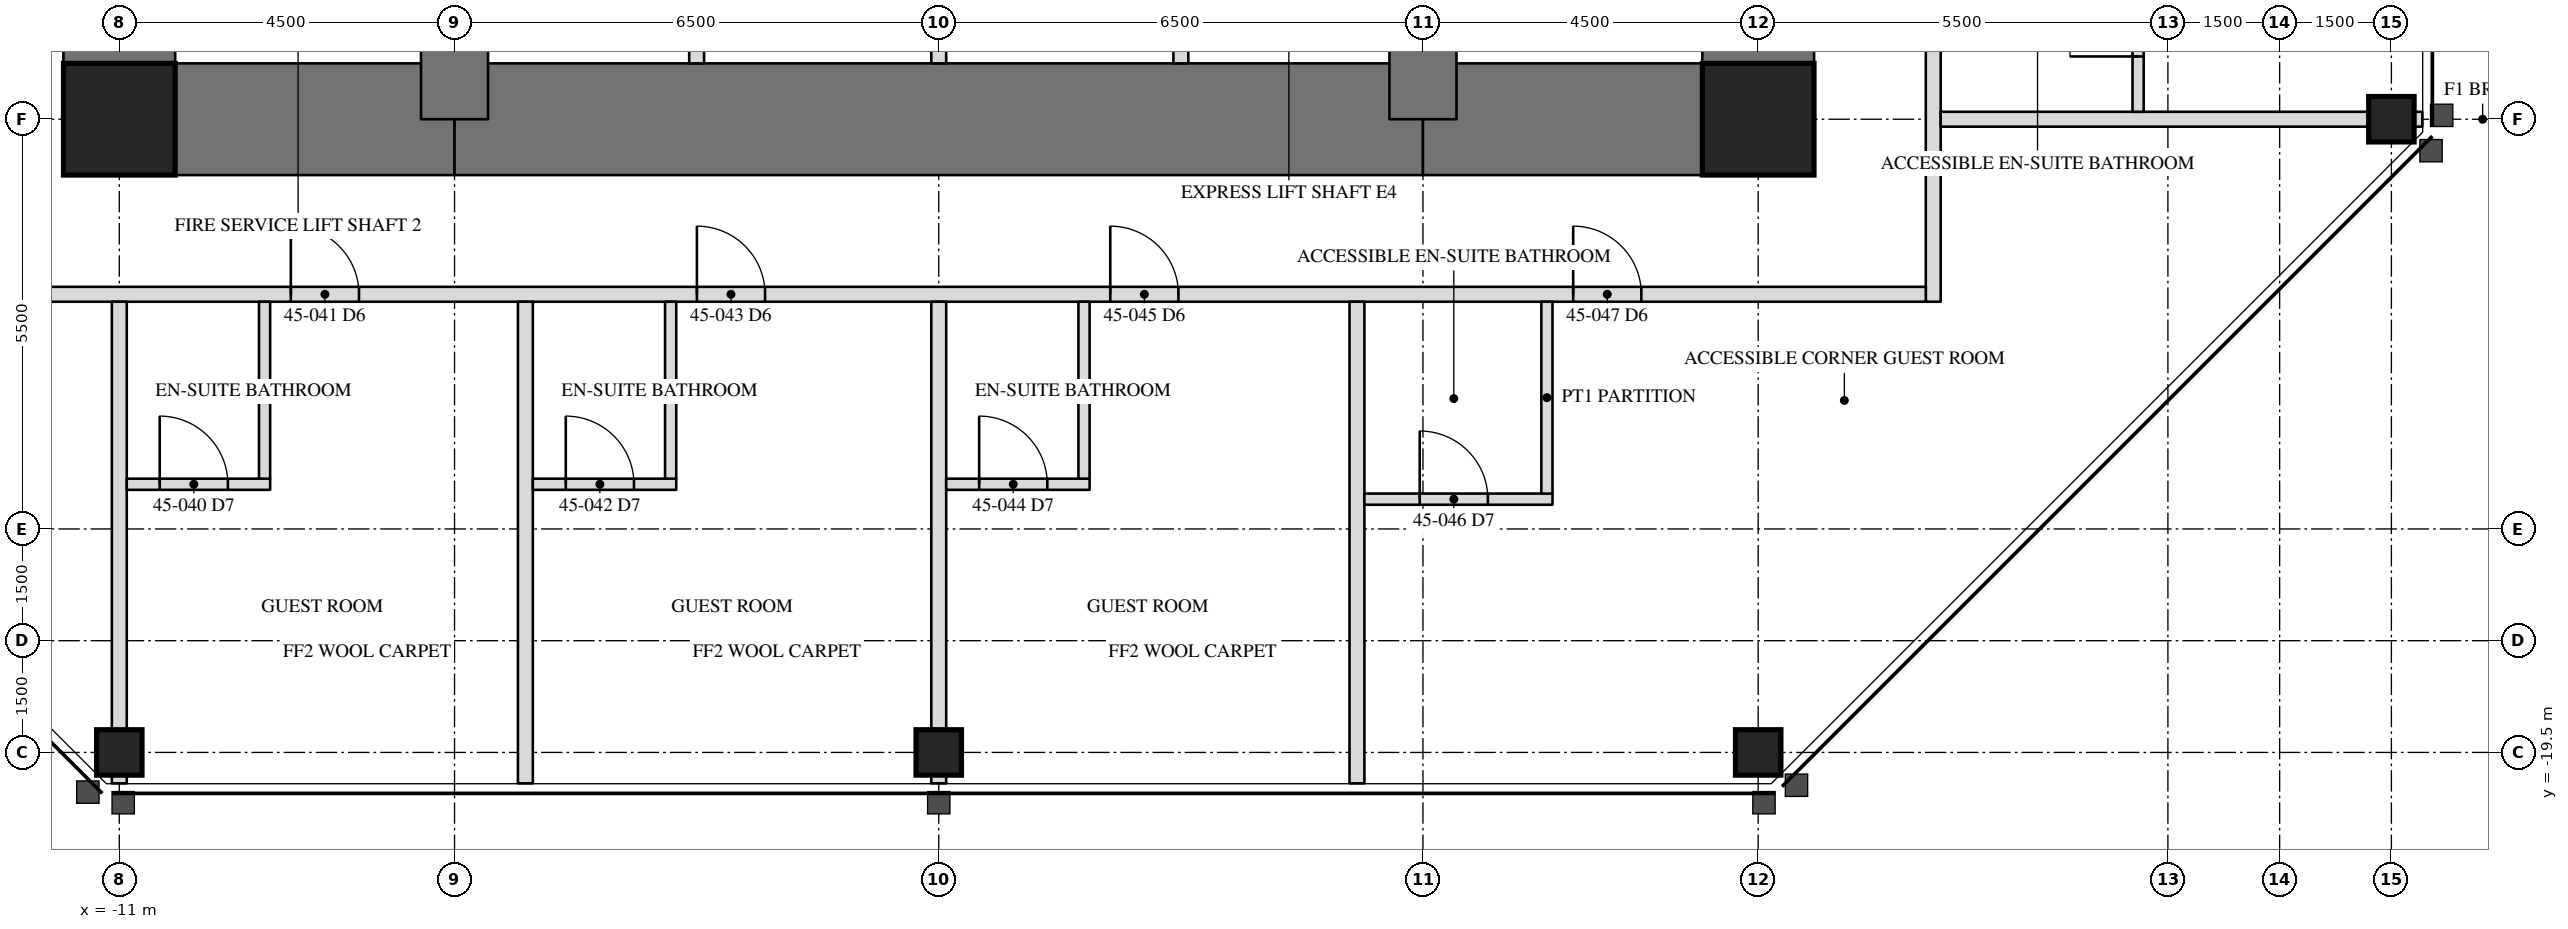
"""IFC4 building model, lengths in metres.
Left out: names, types, materials, properties, quantities, classifications, styles, units other than length and angle.
Written with IfcOpenShell. Run it as: python <this file> out.ifc"""

import sys

from ifc_helpers import new_model, si_unit, direction, frame, frame_2d, origin, origin_2d, place, context, subcontext, project, spatial, rectangle, hollow_rectangle, extrude, element, fill, save


model = new_model("IFC4")
c1 = context("Model", 3, precision=1e-05, world=origin(), true_north=direction((0.0, 1.0)))
c2 = subcontext(c1, "Body", "Model", "MODEL_VIEW")
j1 = project(units=[si_unit("LENGTHUNIT", "METRE"), si_unit("PLANEANGLEUNIT", "RADIAN")], contexts=[c1])
p1 = place(None, origin())
s1 = spatial("IfcSite", under=j1, at=p1, CompositionType="ELEMENT")
p2 = place(p1, origin())
s2 = spatial("IfcBuilding", under=s1, at=p2, CompositionType="ELEMENT")
p3 = place(p2, frame((0.0, 0.0, 194.2)))
s3 = spatial("IfcBuildingStorey", under=s2, at=p3, CompositionType="ELEMENT", Elevation=194.2)
for number, where, z_axis, x_axis in (
    (1, (-11.0, -19.5, 0.0), (0.0, 0.0, 1.0), (1.0, 0.0, 0.0)),
    (2, (0.0, -19.5, 0.0), (0.0, 0.0, 1.0), (1.0, 0.0, 0.0)),
    (3, (11.0, -19.5, 0.0), (0.0, 0.0, 1.0), (1.0, 0.0, 0.0)),
    (4, (19.5, -11.0, 0.0), (0.0, 0.0, 1.0), (0.0, 1.0, 0.0)),
):
    element("IfcColumn", number, at=place(p3, frame(where, z_axis=z_axis, x_axis=x_axis)), inside=s3, PredefinedType="COLUMN", context=c2, shape_type="SweptSolid", body=[
        extrude(hollow_rectangle(XDim=0.61, YDim=0.61, WallThickness=0.076, at=origin_2d()), origin(), (0.0, 0.0, 1.0), 3.5),
    ])
p4 = place(p3, frame((11.0, -11.0, 0.0), z_axis=(0.0, 0.0, 1.0), x_axis=(0.0, 1.0, 0.0)))
e5 = element("IfcWall", 5, at=p4, inside=s3, PredefinedType="SHEAR", context=c2, shape_type="SweptSolid", body=[
    extrude(rectangle(XDim=22.0, YDim=1.5, at=frame_2d((11.0, 0.0))), origin(), (0.0, 0.0, 1.0), 3.5),
])
p5 = place(p4, frame((15.393, 0.0, 0.0)))
e6 = element("IfcOpeningElement", 6, at=p5, cuts=e5, PredefinedType="OPENING", context=c2, shape_type="SweptSolid", body=[
    extrude(rectangle(XDim=0.915, YDim=2.134, at=frame_2d((0.458, 1.067))), frame((0.0, 0.76, 0.0), z_axis=(0.0, -1.0, 0.0), x_axis=(1.0, 0.0, 0.0)), (0.0, 0.0, 1.0), 1.52),
])
p6 = place(p3, frame((-11.0, 11.0, 0.0), z_axis=(0.0, 0.0, 1.0), x_axis=(0.0, -1.0, 0.0)))
e7 = element("IfcWall", 7, at=p6, inside=s3, PredefinedType="SHEAR", context=c2, shape_type="SweptSolid", body=[
    extrude(rectangle(XDim=22.0, YDim=1.5, at=frame_2d((11.0, 0.0))), origin(), (0.0, 0.0, 1.0), 3.5),
])
p7 = place(p6, frame((15.393, 0.0, 0.0)))
e8 = element("IfcOpeningElement", 8, at=p7, cuts=e7, PredefinedType="OPENING", context=c2, shape_type="SweptSolid", body=[
    extrude(rectangle(XDim=0.915, YDim=2.134, at=frame_2d((0.458, 1.067))), frame((0.0, 0.76, 0.0), z_axis=(0.0, -1.0, 0.0), x_axis=(1.0, 0.0, 0.0)), (0.0, 0.0, 1.0), 1.52),
])
p8 = place(p3, frame((-11.0, -11.0, 0.0), z_axis=(0.0, 0.0, 1.0), x_axis=(1.0, 0.0, 0.0)))
e9 = element("IfcWall", 9, at=p8, inside=s3, PredefinedType="SHEAR", context=c2, shape_type="SweptSolid", body=[
    extrude(rectangle(XDim=4.5, YDim=1.5, at=frame_2d((2.25, 0.0))), origin(), (0.0, 0.0, 1.0), 3.5),
])
p9 = place(p3, frame((-6.5, -11.0, 0.0), z_axis=(0.0, 0.0, 1.0), x_axis=(1.0, 0.0, 0.0)))
e10 = element("IfcWall", 10, at=p9, inside=s3, PredefinedType="SHEAR", context=c2, shape_type="SweptSolid", body=[
    extrude(rectangle(XDim=13.0, YDim=1.5, at=frame_2d((6.5, 0.0))), origin(), (0.0, 0.0, 1.0), 3.5),
])
p10 = place(p3, frame((6.5, -11.0, 0.0), z_axis=(0.0, 0.0, 1.0), x_axis=(1.0, 0.0, 0.0)))
e11 = element("IfcWall", 11, at=p10, inside=s3, PredefinedType="SHEAR", context=c2, shape_type="SweptSolid", body=[
    extrude(rectangle(XDim=4.5, YDim=1.5, at=frame_2d((2.25, 0.0))), origin(), (0.0, 0.0, 1.0), 3.5),
])
for number, where, z_axis, x_axis in (
    (12, (6.5, -11.0, 0.0), (0.0, 0.0, 1.0), (0.0, 1.0, 0.0)),
    (13, (-6.5, -6.5, 0.0), (0.0, 0.0, 1.0), (0.0, -1.0, 0.0)),
):
    element("IfcWall", number, at=place(p3, frame(where, z_axis=z_axis, x_axis=x_axis)), inside=s3, PredefinedType="SHEAR", context=c2, shape_type="SweptSolid", body=[
        extrude(rectangle(XDim=4.5, YDim=0.9, at=frame_2d((2.25, 0.0))), origin(), (0.0, 0.0, 1.0), 3.5),
    ])
for number, where, z_axis, x_axis in (
    (14, (-11.0, -11.0, 0.0), (0.0, 0.0, 1.0), (1.0, 0.0, 0.0)),
    (15, (11.0, -11.0, 0.0), (0.0, 0.0, 1.0), (1.0, 0.0, 0.0)),
):
    element("IfcColumn", number, at=place(p3, frame(where, z_axis=z_axis, x_axis=x_axis)), inside=s3, PredefinedType="COLUMN", context=c2, shape_type="SweptSolid", body=[
        extrude(hollow_rectangle(XDim=1.499, YDim=1.499, WallThickness=0.102, at=origin_2d()), origin(), (0.0, 0.0, 1.0), 3.5),
    ])
for number, where, z_axis, x_axis in (
    (16, (-3.25, -10.25, 0.0), (0.0, 0.0, 1.0), (0.0, 1.0, 0.0)),
    (17, (0.0, -10.25, 0.0), (0.0, 0.0, 1.0), (0.0, 1.0, 0.0)),
    (18, (3.25, -10.25, 0.0), (0.0, 0.0, 1.0), (0.0, 1.0, 0.0)),
):
    element("IfcWall", number, at=place(p3, frame(where, z_axis=z_axis, x_axis=x_axis)), inside=s3, PredefinedType="PARTITIONING", context=c2, shape_type="SweptSolid", body=[
        extrude(rectangle(XDim=3.3, YDim=0.2, at=frame_2d((1.65, 0.0))), origin(), (0.0, 0.0, 1.0), 3.31),
    ])
p11 = place(p3, frame((13.35, -13.45, 0.0), z_axis=(0.0, 0.0, 1.0), x_axis=(0.0, 1.0, 0.0)))
e19 = element("IfcWall", 19, at=p11, inside=s3, PredefinedType="PARTITIONING", context=c2, shape_type="SweptSolid", body=[
    extrude(rectangle(XDim=26.7, YDim=0.2, at=frame_2d((13.35, 0.0))), origin(), (0.0, 0.0, 1.0), 3.31),
])
p12 = place(p11, frame((5.353, 0.0, 0.0)))
e20 = element("IfcOpeningElement", 20, at=p12, cuts=e19, PredefinedType="OPENING", context=c2, shape_type="SweptSolid", body=[
    extrude(rectangle(XDim=0.915, YDim=2.134, at=frame_2d((0.458, 1.067))), frame((0.0, 0.11, 0.0), z_axis=(0.0, -1.0, 0.0), x_axis=(1.0, 0.0, 0.0)), (0.0, 0.0, 1.0), 0.22),
])
p13 = place(p11, frame((10.204, 0.0, 0.0)))
e21 = element("IfcOpeningElement", 21, at=p13, cuts=e19, PredefinedType="OPENING", context=c2, shape_type="SweptSolid", body=[
    extrude(rectangle(XDim=0.915, YDim=2.134, at=frame_2d((0.458, 1.067))), frame((0.0, 0.11, 0.0), z_axis=(0.0, -1.0, 0.0), x_axis=(1.0, 0.0, 0.0)), (0.0, 0.0, 1.0), 0.22),
])
p14 = place(p11, frame((15.752, 0.0, 0.0)))
e22 = element("IfcOpeningElement", 22, at=p14, cuts=e19, PredefinedType="OPENING", context=c2, shape_type="SweptSolid", body=[
    extrude(rectangle(XDim=0.915, YDim=2.134, at=frame_2d((0.458, 1.067))), frame((0.0, 0.11, 0.0), z_axis=(0.0, -1.0, 0.0), x_axis=(1.0, 0.0, 0.0)), (0.0, 0.0, 1.0), 0.22),
])
p15 = place(p11, frame((21.366, 0.0, 0.0)))
e23 = element("IfcOpeningElement", 23, at=p15, cuts=e19, PredefinedType="OPENING", context=c2, shape_type="SweptSolid", body=[
    extrude(rectangle(XDim=0.915, YDim=2.134, at=frame_2d((0.458, 1.067))), frame((0.0, 0.11, 0.0), z_axis=(0.0, -1.0, 0.0), x_axis=(1.0, 0.0, 0.0)), (0.0, 0.0, 1.0), 0.22),
])
p16 = place(p3, frame((-13.45, -13.35, 0.0), z_axis=(0.0, 0.0, 1.0), x_axis=(1.0, 0.0, 0.0)))
e24 = element("IfcWall", 24, at=p16, inside=s3, PredefinedType="PARTITIONING", context=c2, shape_type="SweptSolid", body=[
    extrude(rectangle(XDim=26.7, YDim=0.2, at=frame_2d((13.35, 0.0))), origin(), (0.0, 0.0, 1.0), 3.31),
])
p17 = place(p16, frame((4.752, 0.0, 0.0)))
e25 = element("IfcOpeningElement", 25, at=p17, cuts=e24, PredefinedType="OPENING", context=c2, shape_type="SweptSolid", body=[
    extrude(rectangle(XDim=0.915, YDim=2.134, at=frame_2d((0.458, 1.067))), frame((0.0, 0.11, 0.0), z_axis=(0.0, -1.0, 0.0), x_axis=(1.0, 0.0, 0.0)), (0.0, 0.0, 1.0), 0.22),
])
p18 = place(p16, frame((10.204, 0.0, 0.0)))
e26 = element("IfcOpeningElement", 26, at=p18, cuts=e24, PredefinedType="OPENING", context=c2, shape_type="SweptSolid", body=[
    extrude(rectangle(XDim=0.915, YDim=2.134, at=frame_2d((0.458, 1.067))), frame((0.0, 0.11, 0.0), z_axis=(0.0, -1.0, 0.0), x_axis=(1.0, 0.0, 0.0)), (0.0, 0.0, 1.0), 0.22),
])
p19 = place(p16, frame((15.752, 0.0, 0.0)))
e27 = element("IfcOpeningElement", 27, at=p19, cuts=e24, PredefinedType="OPENING", context=c2, shape_type="SweptSolid", body=[
    extrude(rectangle(XDim=0.915, YDim=2.134, at=frame_2d((0.458, 1.067))), frame((0.0, 0.11, 0.0), z_axis=(0.0, -1.0, 0.0), x_axis=(1.0, 0.0, 0.0)), (0.0, 0.0, 1.0), 0.22),
])
p20 = place(p16, frame((21.967, 0.0, 0.0)))
e28 = element("IfcOpeningElement", 28, at=p20, cuts=e24, PredefinedType="OPENING", context=c2, shape_type="SweptSolid", body=[
    extrude(rectangle(XDim=0.915, YDim=2.134, at=frame_2d((0.458, 1.067))), frame((0.0, 0.11, 0.0), z_axis=(0.0, -1.0, 0.0), x_axis=(1.0, 0.0, 0.0)), (0.0, 0.0, 1.0), 0.22),
])
p21 = place(p3, frame((13.45, -11.0, 0.0), z_axis=(0.0, 0.0, 1.0), x_axis=(1.0, 0.0, 0.0)))
e29 = element("IfcWall", 29, at=p21, inside=s3, PredefinedType="PARTITIONING", context=c2, shape_type="SweptSolid", body=[
    extrude(rectangle(XDim=6.465, YDim=0.2, at=frame_2d((3.232, 0.0))), origin(), (0.0, 0.0, 1.0), 2.802),
])
p22 = place(p3, frame((16.1, -10.9, 0.0), z_axis=(0.0, 0.0, 1.0), x_axis=(0.0, 1.0, 0.0)))
e30 = element("IfcWall", 30, at=p22, inside=s3, PredefinedType="PARTITIONING", context=c2, shape_type="SweptSolid", body=[
    extrude(rectangle(XDim=2.525, YDim=0.15, at=frame_2d((1.262, 0.0))), origin(), (0.0, 0.0, 1.0), 3.31),
])
p23 = place(p22, frame((0.742, 0.0, 0.0)))
e31 = element("IfcOpeningElement", 31, at=p23, cuts=e30, PredefinedType="OPENING", context=c2, shape_type="SweptSolid", body=[
    extrude(rectangle(XDim=0.915, YDim=2.032, at=frame_2d((0.458, 1.016))), frame((0.0, 0.085, 0.0), z_axis=(0.0, -1.0, 0.0), x_axis=(1.0, 0.0, 0.0)), (0.0, 0.0, 1.0), 0.17),
])
p24 = place(p3, frame((-11.0, -13.45, 0.0), z_axis=(0.0, 0.0, 1.0), x_axis=(0.0, -1.0, 0.0)))
e32 = element("IfcWall", 32, at=p24, inside=s3, PredefinedType="PARTITIONING", context=c2, shape_type="SweptSolid", body=[
    extrude(rectangle(XDim=6.465, YDim=0.2, at=frame_2d((3.232, 0.0))), origin(), (0.0, 0.0, 1.0), 2.802),
])
p25 = place(p3, frame((-5.549, -13.45, 0.0), z_axis=(0.0, 0.0, 1.0), x_axis=(0.0, -1.0, 0.0)))
e33 = element("IfcWall", 33, at=p25, inside=s3, PredefinedType="PARTITIONING", context=c2, shape_type="SweptSolid", body=[
    extrude(rectangle(XDim=6.465, YDim=0.2, at=frame_2d((3.232, 0.0))), origin(), (0.0, 0.0, 1.0), 3.31),
])
p26 = place(p3, frame((0.0, -13.45, 0.0), z_axis=(0.0, 0.0, 1.0), x_axis=(0.0, -1.0, 0.0)))
e34 = element("IfcWall", 34, at=p26, inside=s3, PredefinedType="PARTITIONING", context=c2, shape_type="SweptSolid", body=[
    extrude(rectangle(XDim=6.465, YDim=0.2, at=frame_2d((3.232, 0.0))), origin(), (0.0, 0.0, 1.0), 2.802),
])
p27 = place(p3, frame((5.614, -13.45, 0.0), z_axis=(0.0, 0.0, 1.0), x_axis=(0.0, -1.0, 0.0)))
e35 = element("IfcWall", 35, at=p27, inside=s3, PredefinedType="PARTITIONING", context=c2, shape_type="SweptSolid", body=[
    extrude(rectangle(XDim=6.465, YDim=0.2, at=frame_2d((3.232, 0.0))), origin(), (0.0, 0.0, 1.0), 3.31),
])
p28 = place(p3, frame((-10.9, -15.9, 0.0), z_axis=(0.0, 0.0, 1.0), x_axis=(1.0, 0.0, 0.0)))
e36 = element("IfcWall", 36, at=p28, inside=s3, PredefinedType="PARTITIONING", context=c2, shape_type="SweptSolid", body=[
    extrude(rectangle(XDim=1.925, YDim=0.15, at=frame_2d((0.962, 0.0))), origin(), (0.0, 0.0, 1.0), 3.31),
])
p29 = place(p28, frame((0.442, 0.0, 0.0)))
e37 = element("IfcOpeningElement", 37, at=p29, cuts=e36, PredefinedType="OPENING", context=c2, shape_type="SweptSolid", body=[
    extrude(rectangle(XDim=0.915, YDim=2.032, at=frame_2d((0.458, 1.016))), frame((0.0, 0.085, 0.0), z_axis=(0.0, -1.0, 0.0), x_axis=(1.0, 0.0, 0.0)), (0.0, 0.0, 1.0), 0.17),
])
p30 = place(p3, frame((-9.05, -13.45, 0.0), z_axis=(0.0, 0.0, 1.0), x_axis=(0.0, -1.0, 0.0)))
e38 = element("IfcWall", 38, at=p30, inside=s3, PredefinedType="PARTITIONING", context=c2, shape_type="SweptSolid", body=[
    extrude(rectangle(XDim=2.375, YDim=0.15, at=frame_2d((1.188, 0.0))), origin(), (0.0, 0.0, 1.0), 3.31),
])
p31 = place(p3, frame((-5.449, -15.9, 0.0), z_axis=(0.0, 0.0, 1.0), x_axis=(1.0, 0.0, 0.0)))
e39 = element("IfcWall", 39, at=p31, inside=s3, PredefinedType="PARTITIONING", context=c2, shape_type="SweptSolid", body=[
    extrude(rectangle(XDim=1.925, YDim=0.15, at=frame_2d((0.962, 0.0))), origin(), (0.0, 0.0, 1.0), 3.31),
])
p32 = place(p31, frame((0.442, 0.0, 0.0)))
e40 = element("IfcOpeningElement", 40, at=p32, cuts=e39, PredefinedType="OPENING", context=c2, shape_type="SweptSolid", body=[
    extrude(rectangle(XDim=0.915, YDim=2.032, at=frame_2d((0.458, 1.016))), frame((0.0, 0.085, 0.0), z_axis=(0.0, -1.0, 0.0), x_axis=(1.0, 0.0, 0.0)), (0.0, 0.0, 1.0), 0.17),
])
p33 = place(p3, frame((-3.599, -13.45, 0.0), z_axis=(0.0, 0.0, 1.0), x_axis=(0.0, -1.0, 0.0)))
e41 = element("IfcWall", 41, at=p33, inside=s3, PredefinedType="PARTITIONING", context=c2, shape_type="SweptSolid", body=[
    extrude(rectangle(XDim=2.375, YDim=0.15, at=frame_2d((1.188, 0.0))), origin(), (0.0, 0.0, 1.0), 2.703),
])
p34 = place(p3, frame((0.1, -15.9, 0.0), z_axis=(0.0, 0.0, 1.0), x_axis=(1.0, 0.0, 0.0)))
e42 = element("IfcWall", 42, at=p34, inside=s3, PredefinedType="PARTITIONING", context=c2, shape_type="SweptSolid", body=[
    extrude(rectangle(XDim=1.925, YDim=0.15, at=frame_2d((0.962, 0.0))), origin(), (0.0, 0.0, 1.0), 3.31),
])
p35 = place(p34, frame((0.442, 0.0, 0.0)))
e43 = element("IfcOpeningElement", 43, at=p35, cuts=e42, PredefinedType="OPENING", context=c2, shape_type="SweptSolid", body=[
    extrude(rectangle(XDim=0.915, YDim=2.032, at=frame_2d((0.458, 1.016))), frame((0.0, 0.085, 0.0), z_axis=(0.0, -1.0, 0.0), x_axis=(1.0, 0.0, 0.0)), (0.0, 0.0, 1.0), 0.17),
])
p36 = place(p3, frame((1.95, -13.45, 0.0), z_axis=(0.0, 0.0, 1.0), x_axis=(0.0, -1.0, 0.0)))
e44 = element("IfcWall", 44, at=p36, inside=s3, PredefinedType="PARTITIONING", context=c2, shape_type="SweptSolid", body=[
    extrude(rectangle(XDim=2.375, YDim=0.15, at=frame_2d((1.188, 0.0))), origin(), (0.0, 0.0, 1.0), 3.31),
])
p37 = place(p3, frame((5.714, -16.1, 0.0), z_axis=(0.0, 0.0, 1.0), x_axis=(1.0, 0.0, 0.0)))
e45 = element("IfcWall", 45, at=p37, inside=s3, PredefinedType="PARTITIONING", context=c2, shape_type="SweptSolid", body=[
    extrude(rectangle(XDim=2.525, YDim=0.15, at=frame_2d((1.262, 0.0))), origin(), (0.0, 0.0, 1.0), 3.31),
])
p38 = place(p37, frame((0.742, 0.0, 0.0)))
e46 = element("IfcOpeningElement", 46, at=p38, cuts=e45, PredefinedType="OPENING", context=c2, shape_type="SweptSolid", body=[
    extrude(rectangle(XDim=0.915, YDim=2.032, at=frame_2d((0.458, 1.016))), frame((0.0, 0.085, 0.0), z_axis=(0.0, -1.0, 0.0), x_axis=(1.0, 0.0, 0.0)), (0.0, 0.0, 1.0), 0.17),
])
p39 = place(p3, frame((8.164, -13.45, 0.0), z_axis=(0.0, 0.0, 1.0), x_axis=(0.0, -1.0, 0.0)))
e47 = element("IfcWall", 47, at=p39, inside=s3, PredefinedType="PARTITIONING", context=c2, shape_type="SweptSolid", body=[
    extrude(rectangle(XDim=2.575, YDim=0.15, at=frame_2d((1.288, 0.0))), origin(), (0.0, 0.0, 1.0), 3.31),
])
p40 = place(p23, origin())
e48 = element("IfcDoor", 48, at=p40, inside=s3, OperationType="SINGLE_SWING_LEFT", PredefinedType="DOOR", context=c2, shape_type="SweptSolid", body=[
    extrude(rectangle(XDim=0.915, YDim=2.032, at=frame_2d((0.458, 1.016))), frame((0.0, 0.025, 0.0), z_axis=(0.0, -1.0, 0.0), x_axis=(1.0, 0.0, 0.0)), (0.0, 0.0, 1.0), 0.05),
])
fill(e31, e48)
p41 = place(p29, origin())
e49 = element("IfcDoor", 49, at=p41, inside=s3, OperationType="SINGLE_SWING_LEFT", PredefinedType="DOOR", context=c2, shape_type="SweptSolid", body=[
    extrude(rectangle(XDim=0.915, YDim=2.032, at=frame_2d((0.458, 1.016))), frame((0.0, 0.025, 0.0), z_axis=(0.0, -1.0, 0.0), x_axis=(1.0, 0.0, 0.0)), (0.0, 0.0, 1.0), 0.05),
])
fill(e37, e49)
p42 = place(p17, origin())
e50 = element("IfcDoor", 50, at=p42, inside=s3, OperationType="SINGLE_SWING_LEFT", PredefinedType="DOOR", context=c2, shape_type="SweptSolid", body=[
    extrude(rectangle(XDim=0.915, YDim=2.134, at=frame_2d((0.458, 1.067))), frame((0.0, 0.025, 0.0), z_axis=(0.0, -1.0, 0.0), x_axis=(1.0, 0.0, 0.0)), (0.0, 0.0, 1.0), 0.05),
])
fill(e25, e50)
p43 = place(p32, origin())
e51 = element("IfcDoor", 51, at=p43, inside=s3, OperationType="SINGLE_SWING_LEFT", PredefinedType="DOOR", context=c2, shape_type="SweptSolid", body=[
    extrude(rectangle(XDim=0.915, YDim=2.032, at=frame_2d((0.458, 1.016))), frame((0.0, 0.025, 0.0), z_axis=(0.0, -1.0, 0.0), x_axis=(1.0, 0.0, 0.0)), (0.0, 0.0, 1.0), 0.05),
])
fill(e40, e51)
p44 = place(p18, origin())
e52 = element("IfcDoor", 52, at=p44, inside=s3, OperationType="SINGLE_SWING_LEFT", PredefinedType="DOOR", context=c2, shape_type="SweptSolid", body=[
    extrude(rectangle(XDim=0.915, YDim=2.134, at=frame_2d((0.458, 1.067))), frame((0.0, 0.025, 0.0), z_axis=(0.0, -1.0, 0.0), x_axis=(1.0, 0.0, 0.0)), (0.0, 0.0, 1.0), 0.05),
])
fill(e26, e52)
p45 = place(p35, origin())
e53 = element("IfcDoor", 53, at=p45, inside=s3, OperationType="SINGLE_SWING_LEFT", PredefinedType="DOOR", context=c2, shape_type="SweptSolid", body=[
    extrude(rectangle(XDim=0.915, YDim=2.032, at=frame_2d((0.458, 1.016))), frame((0.0, 0.025, 0.0), z_axis=(0.0, -1.0, 0.0), x_axis=(1.0, 0.0, 0.0)), (0.0, 0.0, 1.0), 0.05),
])
fill(e43, e53)
p46 = place(p19, origin())
e54 = element("IfcDoor", 54, at=p46, inside=s3, OperationType="SINGLE_SWING_LEFT", PredefinedType="DOOR", context=c2, shape_type="SweptSolid", body=[
    extrude(rectangle(XDim=0.915, YDim=2.134, at=frame_2d((0.458, 1.067))), frame((0.0, 0.025, 0.0), z_axis=(0.0, -1.0, 0.0), x_axis=(1.0, 0.0, 0.0)), (0.0, 0.0, 1.0), 0.05),
])
fill(e27, e54)
p47 = place(p38, origin())
e55 = element("IfcDoor", 55, at=p47, inside=s3, OperationType="SINGLE_SWING_LEFT", PredefinedType="DOOR", context=c2, shape_type="SweptSolid", body=[
    extrude(rectangle(XDim=0.915, YDim=2.032, at=frame_2d((0.458, 1.016))), frame((0.0, 0.025, 0.0), z_axis=(0.0, -1.0, 0.0), x_axis=(1.0, 0.0, 0.0)), (0.0, 0.0, 1.0), 0.05),
])
fill(e46, e55)
p48 = place(p20, origin())
e56 = element("IfcDoor", 56, at=p48, inside=s3, OperationType="SINGLE_SWING_LEFT", PredefinedType="DOOR", context=c2, shape_type="SweptSolid", body=[
    extrude(rectangle(XDim=0.915, YDim=2.134, at=frame_2d((0.458, 1.067))), frame((0.0, 0.025, 0.0), z_axis=(0.0, -1.0, 0.0), x_axis=(1.0, 0.0, 0.0)), (0.0, 0.0, 1.0), 0.05),
])
fill(e28, e56)
save(model, sys.argv[1])
